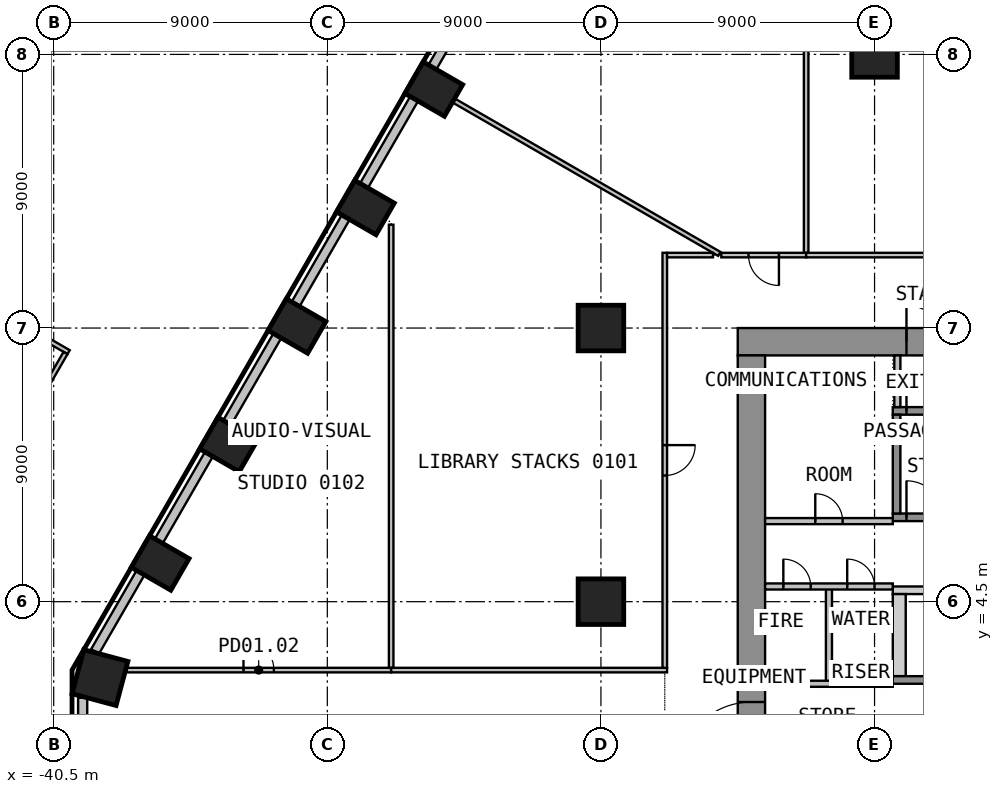
"""IFC4 building model, lengths in metres.
Left out: names, types, materials, properties, quantities, classifications, styles, units other than length and angle.
Written with IfcOpenShell. Run it as: python <this file> out.ifc"""

import sys

from ifc_helpers import new_model, si_unit, direction, frame, frame_2d, origin, origin_2d, place, context, subcontext, project, spatial, polyline, rectangle, circle, outline, extrude, element, fill, save


model = new_model("IFC4")
c1 = context("Model", 3, precision=1e-05, world=origin(), true_north=direction((0.0, 1.0)))
c2 = subcontext(c1, "Body", "Model", "MODEL_VIEW")
j1 = project(units=[si_unit("LENGTHUNIT", "METRE"), si_unit("PLANEANGLEUNIT", "RADIAN")], contexts=[c1])
p1 = place(None, origin())
s1 = spatial("IfcSite", under=j1, at=p1, CompositionType="ELEMENT")
p2 = place(p1, origin())
s2 = spatial("IfcBuilding", under=s1, at=p2, CompositionType="ELEMENT")
p3 = place(p2, frame((0.0, 0.0, 6.0)))
s3 = spatial("IfcBuildingStorey", under=s2, at=p3, CompositionType="ELEMENT", Elevation=6.0)
for number, where, z_axis, x_axis in (
    (1, (-27.998, 21.361, 0.0), (0.0, 0.0, 1.0), (-0.5, -0.866, 0.0)),
    (2, (-30.248, 17.463, 0.0), (0.0, 0.0, 1.0), (-0.5, -0.866, 0.0)),
    (3, (-32.498, 13.566, 0.0), (0.0, 0.0, 1.0), (-0.5, -0.866, 0.0)),
    (4, (-34.748, 9.669, 0.0), (0.0, 0.0, 1.0), (-0.5, -0.866, 0.0)),
    (5, (-36.998, 5.772, 0.0), (0.0, 0.0, 1.0), (-0.5, -0.866, 0.0)),
):
    element("IfcColumn", number, at=place(p3, frame(where, z_axis=z_axis, x_axis=x_axis)), inside=s3, PredefinedType="COLUMN", context=c2, shape_type="SweptSolid", body=[
        extrude(rectangle(XDim=1.2, YDim=1.5, at=origin_2d()), origin(), (0.0, 0.0, 1.0), 4.4),
    ])
p4 = place(p3, frame((-38.979, 2.004, 0.0), z_axis=(0.0, 0.0, 1.0), x_axis=(-0.258819045103, -0.965925826289, 0.0)))
e6 = element("IfcColumn", 6, at=p4, inside=s3, PredefinedType="COLUMN", context=c2, shape_type="SweptSolid", body=[
    extrude(rectangle(XDim=1.5, YDim=1.5, at=origin_2d()), origin(), (0.0, 0.0, 1.0), 4.4),
])
for number, where, z_axis, x_axis in (
    (7, (-22.5, 4.5, 0.0), (0.0, 0.0, 1.0), (1.0, 0.0, 0.0)),
    (8, (-22.5, 13.5, 0.0), (0.0, 0.0, 1.0), (1.0, 0.0, 0.0)),
    (9, (-13.5, 22.5, 0.0), (0.0, 0.0, 1.0), (1.0, 0.0, 0.0)),
):
    element("IfcColumn", number, at=place(p3, frame(where, z_axis=z_axis, x_axis=x_axis)), inside=s3, PredefinedType="COLUMN", context=c2, shape_type="SweptSolid", body=[
        extrude(circle(Radius=0.75, at=origin_2d()), origin(), (0.0, 0.0, 1.0), 4.4),
    ])
for number, where, z_axis, x_axis in (
    (10, (-26.394, 24.938, 0.0), (0.0, 0.0, 1.0), (-0.5, -0.866, 0.0)),
    (11, (-28.644, 21.041, 0.0), (0.0, 0.0, 1.0), (-0.5, -0.866, 0.0)),
    (12, (-30.894, 17.143, 0.0), (0.0, 0.0, 1.0), (-0.5, -0.866, 0.0)),
    (13, (-33.144, 13.246, 0.0), (0.0, 0.0, 1.0), (-0.5, -0.866, 0.0)),
    (14, (-35.394, 9.349, 0.0), (0.0, 0.0, 1.0), (-0.5, -0.866, 0.0)),
):
    element("IfcWall", number, at=place(p3, frame(where, z_axis=z_axis, x_axis=x_axis)), inside=s3, PredefinedType="SOLIDWALL", context=c2, shape_type="SweptSolid", body=[
        extrude(rectangle(XDim=3.299, YDim=0.3, at=frame_2d((1.649, 0.0))), origin(), (0.0, 0.0, 1.0), 4.4),
    ])
p5 = place(p3, frame((-37.644, 5.452, 0.0), z_axis=(0.0, 0.0, 1.0), x_axis=(-0.49999586137, -0.866027793211, 0.0)))
e15 = element("IfcWall", 15, at=p5, inside=s3, PredefinedType="SOLIDWALL", context=c2, shape_type="SweptSolid", body=[
    extrude(rectangle(XDim=2.989, YDim=0.3, at=frame_2d((1.494, 0.0))), origin(), (0.0, 0.0, 1.0), 4.4),
])
p6 = place(p3, frame((-39.547, 1.339, 0.0), z_axis=(0.0, 0.0, 1.0), x_axis=(0.0, -1.0, 0.0)))
e16 = element("IfcWall", 16, at=p6, inside=s3, PredefinedType="SOLIDWALL", context=c2, shape_type="SweptSolid", body=[
    extrude(rectangle(XDim=2.679, YDim=0.3, at=frame_2d((1.339, 0.0))), origin(), (0.0, 0.0, 1.0), 4.4),
])
p7 = place(p3, frame((-18.0, 13.05, 0.0), z_axis=(0.0, 0.0, 1.0), x_axis=(1.0, 0.0, 0.0)))
e17 = element("IfcWall", 17, at=p7, inside=s3, PredefinedType="SHEAR", context=c2, shape_type="SweptSolid", body=[
    extrude(rectangle(XDim=36.0, YDim=0.9, at=frame_2d((18.0, 0.0))), origin(), (0.0, 0.0, 1.0), 4.4),
])
p8 = place(p7, frame((16.8, 0.0, 0.0)))
e18 = element("IfcOpeningElement", 18, at=p8, cuts=e17, PredefinedType="OPENING", context=c2, shape_type="SweptSolid", body=[
    extrude(rectangle(XDim=2.4, YDim=2.1, at=frame_2d((1.2, 1.05))), frame((0.0, 0.46, 0.0), z_axis=(0.0, -1.0, 0.0), x_axis=(1.0, 0.0, 0.0)), (0.0, 0.0, 1.0), 0.92),
])
p9 = place(p7, frame((5.55, 0.0, 0.0)))
e19 = element("IfcOpeningElement", 19, at=p9, cuts=e17, PredefinedType="OPENING", context=c2, shape_type="SweptSolid", body=[
    extrude(rectangle(XDim=1.2, YDim=2.1, at=frame_2d((0.6, 1.05))), frame((0.0, 0.46, 0.0), z_axis=(0.0, -1.0, 0.0), x_axis=(1.0, 0.0, 0.0)), (0.0, 0.0, 1.0), 0.92),
])
p10 = place(p7, frame((29.25, 0.0, 0.0)))
e20 = element("IfcOpeningElement", 20, at=p10, cuts=e17, PredefinedType="OPENING", context=c2, shape_type="SweptSolid", body=[
    extrude(rectangle(XDim=1.2, YDim=2.1, at=frame_2d((0.6, 1.05))), frame((0.0, 0.46, 0.0), z_axis=(0.0, -1.0, 0.0), x_axis=(1.0, 0.0, 0.0)), (0.0, 0.0, 1.0), 0.92),
])
p11 = place(p3, frame((-17.55, -12.6, 0.0), z_axis=(0.0, 0.0, 1.0), x_axis=(0.0, 1.0, 0.0)))
e21 = element("IfcWall", 21, at=p11, inside=s3, PredefinedType="SHEAR", context=c2, shape_type="SweptSolid", body=[
    extrude(rectangle(XDim=25.2, YDim=0.9, at=frame_2d((12.6, 0.0))), origin(), (0.0, 0.0, 1.0), 4.4),
])
p12 = place(p11, frame((11.4, 0.0, 0.0)))
e22 = element("IfcOpeningElement", 22, at=p12, cuts=e21, PredefinedType="OPENING", context=c2, shape_type="SweptSolid", body=[
    extrude(rectangle(XDim=2.4, YDim=2.1, at=frame_2d((1.2, 1.05))), frame((0.0, 0.46, 0.0), z_axis=(0.0, -1.0, 0.0), x_axis=(1.0, 0.0, 0.0)), (0.0, 0.0, 1.0), 0.92),
])
p13 = place(p3, origin())
e23 = element("IfcWall", 23, at=p13, inside=s3, PredefinedType="SHEAR", context=c2, shape_type="SweptSolid", body=[
    extrude(outline(polyline([(-12.9, 4.75), (12.9, 4.75), (12.9, 5.0), (-12.9, 5.0), (-12.9, 4.75)])), origin(), (0.0, 0.0, 1.0), 4.4),
])
p14 = place(p3, origin())
e24 = element("IfcWall", 24, at=p14, inside=s3, PredefinedType="SHEAR", context=c2, shape_type="SweptSolid", body=[
    extrude(outline(polyline([(-12.9, 2.05), (-12.475, 2.05), (-12.475, 4.75), (-12.9, 4.75), (-12.9, 2.05)])), origin(), (0.0, 0.0, 1.0), 4.4),
])
p15 = place(p3, frame((-12.9, 1.925, 0.0), z_axis=(0.0, 0.0, 1.0), x_axis=(1.0, 0.0, 0.0)))
e25 = element("IfcWall", 25, at=p15, inside=s3, PredefinedType="SHEAR", context=c2, shape_type="SweptSolid", body=[
    extrude(rectangle(XDim=25.8, YDim=0.25, at=frame_2d((12.9, 0.0))), origin(), (0.0, 0.0, 1.0), 4.4),
])
p16 = place(p15, frame((9.5, 0.0, 0.0)))
e26 = element("IfcOpeningElement", 26, at=p16, cuts=e25, PredefinedType="OPENING", context=c2, shape_type="SweptSolid", body=[
    extrude(rectangle(XDim=1.2, YDim=2.1, at=frame_2d((0.6, 1.05))), frame((0.0, 0.135, 0.0), z_axis=(0.0, -1.0, 0.0), x_axis=(1.0, 0.0, 0.0)), (0.0, 0.0, 1.0), 0.27),
])
p17 = place(p15, frame((12.3, 0.0, 0.0)))
e27 = element("IfcOpeningElement", 27, at=p17, cuts=e25, PredefinedType="OPENING", context=c2, shape_type="SweptSolid", body=[
    extrude(rectangle(XDim=1.2, YDim=2.1, at=frame_2d((0.6, 1.05))), frame((0.0, 0.135, 0.0), z_axis=(0.0, -1.0, 0.0), x_axis=(1.0, 0.0, 0.0)), (0.0, 0.0, 1.0), 0.27),
])
p18 = place(p15, frame((15.1, 0.0, 0.0)))
e28 = element("IfcOpeningElement", 28, at=p18, cuts=e25, PredefinedType="OPENING", context=c2, shape_type="SweptSolid", body=[
    extrude(rectangle(XDim=1.2, YDim=2.1, at=frame_2d((0.6, 1.05))), frame((0.0, 0.135, 0.0), z_axis=(0.0, -1.0, 0.0), x_axis=(1.0, 0.0, 0.0)), (0.0, 0.0, 1.0), 0.27),
])
p19 = place(p15, frame((17.9, 0.0, 0.0)))
e29 = element("IfcOpeningElement", 29, at=p19, cuts=e25, PredefinedType="OPENING", context=c2, shape_type="SweptSolid", body=[
    extrude(rectangle(XDim=1.2, YDim=2.1, at=frame_2d((0.6, 1.05))), frame((0.0, 0.135, 0.0), z_axis=(0.0, -1.0, 0.0), x_axis=(1.0, 0.0, 0.0)), (0.0, 0.0, 1.0), 0.27),
])
p20 = place(p15, frame((20.7, 0.0, 0.0)))
e30 = element("IfcOpeningElement", 30, at=p20, cuts=e25, PredefinedType="OPENING", context=c2, shape_type="SweptSolid", body=[
    extrude(rectangle(XDim=1.2, YDim=2.1, at=frame_2d((0.6, 1.05))), frame((0.0, 0.135, 0.0), z_axis=(0.0, -1.0, 0.0), x_axis=(1.0, 0.0, 0.0)), (0.0, 0.0, 1.0), 0.27),
])
p21 = place(p15, frame((23.5, 0.0, 0.0)))
e31 = element("IfcOpeningElement", 31, at=p21, cuts=e25, PredefinedType="OPENING", context=c2, shape_type="SweptSolid", body=[
    extrude(rectangle(XDim=1.2, YDim=2.1, at=frame_2d((0.6, 1.05))), frame((0.0, 0.135, 0.0), z_axis=(0.0, -1.0, 0.0), x_axis=(1.0, 0.0, 0.0)), (0.0, 0.0, 1.0), 0.27),
])
p22 = place(p3, frame((-12.9, 7.275, 0.0), z_axis=(0.0, 0.0, 1.0), x_axis=(1.0, 0.0, 0.0)))
e32 = element("IfcWall", 32, at=p22, inside=s3, PredefinedType="SHEAR", context=c2, shape_type="SweptSolid", body=[
    extrude(rectangle(XDim=10.1, YDim=0.25, at=frame_2d((5.05, 0.0))), origin(), (0.0, 0.0, 1.0), 4.4),
])
p23 = place(p22, frame((0.45, 0.0, 0.0)))
e33 = element("IfcOpeningElement", 33, at=p23, cuts=e32, PredefinedType="OPENING", context=c2, shape_type="SweptSolid", body=[
    extrude(rectangle(XDim=1.2, YDim=2.1, at=frame_2d((0.6, 1.05))), frame((0.0, 0.135, 0.0), z_axis=(0.0, -1.0, 0.0), x_axis=(1.0, 0.0, 0.0)), (0.0, 0.0, 1.0), 0.27),
])
p24 = place(p3, frame((-12.9, 10.775, 0.0), z_axis=(0.0, 0.0, 1.0), x_axis=(1.0, 0.0, 0.0)))
e34 = element("IfcWall", 34, at=p24, inside=s3, PredefinedType="SHEAR", context=c2, shape_type="SweptSolid", body=[
    extrude(rectangle(XDim=10.1, YDim=0.25, at=frame_2d((5.05, 0.0))), origin(), (0.0, 0.0, 1.0), 4.4),
])
p25 = place(p24, frame((0.45, 0.0, 0.0)))
e35 = element("IfcOpeningElement", 35, at=p25, cuts=e34, PredefinedType="OPENING", context=c2, shape_type="SweptSolid", body=[
    extrude(rectangle(XDim=1.2, YDim=2.1, at=frame_2d((0.6, 1.05))), frame((0.0, 0.135, 0.0), z_axis=(0.0, -1.0, 0.0), x_axis=(1.0, 0.0, 0.0)), (0.0, 0.0, 1.0), 0.27),
])
p26 = place(p3, frame((-12.775, 7.4, 0.0), z_axis=(0.0, 0.0, 1.0), x_axis=(0.0, 1.0, 0.0)))
e36 = element("IfcWall", 36, at=p26, inside=s3, PredefinedType="SHEAR", context=c2, shape_type="SweptSolid", body=[
    extrude(rectangle(XDim=3.25, YDim=0.25, at=frame_2d((1.625, 0.0))), origin(), (0.0, 0.0, 1.0), 4.4),
])
p27 = place(p3, frame((-12.75, 10.9, 0.0), z_axis=(0.0, 0.0, 1.0), x_axis=(0.0, 1.0, 0.0)))
e37 = element("IfcWall", 37, at=p27, inside=s3, PredefinedType="PARTITIONING", context=c2, shape_type="SweptSolid", body=[
    extrude(rectangle(XDim=1.7, YDim=0.2, at=frame_2d((0.85, 0.0))), origin(), (0.0, 0.0, 1.0), 4.4),
])
p28 = place(p3, frame((-17.1, 7.15, 0.0), z_axis=(0.0, 0.0, 1.0), x_axis=(1.0, 0.0, 0.0)))
e38 = element("IfcWall", 38, at=p28, inside=s3, PredefinedType="PARTITIONING", context=c2, shape_type="SweptSolid", body=[
    extrude(rectangle(XDim=4.2, YDim=0.2, at=frame_2d((2.1, 0.0))), origin(), (0.0, 0.0, 1.0), 4.4),
])
p29 = place(p28, frame((1.65, 0.0, 0.0)))
e39 = element("IfcOpeningElement", 39, at=p29, cuts=e38, PredefinedType="OPENING", context=c2, shape_type="SweptSolid", body=[
    extrude(rectangle(XDim=0.9, YDim=2.1, at=frame_2d((0.45, 1.05))), frame((0.0, 0.11, 0.0), z_axis=(0.0, -1.0, 0.0), x_axis=(1.0, 0.0, 0.0)), (0.0, 0.0, 1.0), 0.22),
])
p30 = place(p3, frame((-15.0, 1.8, 0.0), z_axis=(0.0, 0.0, 1.0), x_axis=(0.0, 1.0, 0.0)))
e40 = element("IfcWall", 40, at=p30, inside=s3, PredefinedType="PARTITIONING", context=c2, shape_type="SweptSolid", body=[
    extrude(rectangle(XDim=3.2, YDim=0.2, at=frame_2d((1.6, 0.0))), origin(), (0.0, 0.0, 1.0), 4.4),
])
p31 = place(p3, frame((-17.1, 5.0, 0.0), z_axis=(0.0, 0.0, 1.0), x_axis=(1.0, 0.0, 0.0)))
e41 = element("IfcWall", 41, at=p31, inside=s3, PredefinedType="PARTITIONING", context=c2, shape_type="SweptSolid", body=[
    extrude(rectangle(XDim=4.2, YDim=0.2, at=frame_2d((2.1, 0.0))), origin(), (0.0, 0.0, 1.0), 4.4),
])
p32 = place(p31, frame((0.6, 0.0, 0.0)))
e42 = element("IfcOpeningElement", 42, at=p32, cuts=e41, PredefinedType="OPENING", context=c2, shape_type="SweptSolid", body=[
    extrude(rectangle(XDim=0.9, YDim=2.1, at=frame_2d((0.45, 1.05))), frame((0.0, 0.11, 0.0), z_axis=(0.0, -1.0, 0.0), x_axis=(1.0, 0.0, 0.0)), (0.0, 0.0, 1.0), 0.22),
])
p33 = place(p31, frame((2.7, 0.0, 0.0)))
e43 = element("IfcOpeningElement", 43, at=p33, cuts=e41, PredefinedType="OPENING", context=c2, shape_type="SweptSolid", body=[
    extrude(rectangle(XDim=0.9, YDim=2.1, at=frame_2d((0.45, 1.05))), frame((0.0, 0.11, 0.0), z_axis=(0.0, -1.0, 0.0), x_axis=(1.0, 0.0, 0.0)), (0.0, 0.0, 1.0), 0.22),
])
p34 = place(p3, frame((-17.1, 1.8, 0.0), z_axis=(0.0, 0.0, 1.0), x_axis=(1.0, 0.0, 0.0)))
e44 = element("IfcWall", 44, at=p34, inside=s3, PredefinedType="PARTITIONING", context=c2, shape_type="SweptSolid", body=[
    extrude(rectangle(XDim=4.2, YDim=0.2, at=frame_2d((2.1, 0.0))), origin(), (0.0, 0.0, 1.0), 4.4),
])
p35 = place(p3, frame((-40.009, 12.707, 0.0), z_axis=(0.0, 0.0, 1.0), x_axis=(-0.866024693403, 0.500001230415, 0.0)))
e45 = element("IfcWall", 45, at=p35, inside=s3, PredefinedType="PARTITIONING", context=c2, shape_type="SweptSolid", body=[
    extrude(rectangle(XDim=8.743, YDim=0.15, at=frame_2d((4.372, 0.0))), origin(), (0.0, 0.0, 1.0), 4.05),
])
p36 = place(p3, frame((-45.26, 3.762, 0.0), z_axis=(0.0, 0.0, 1.0), x_axis=(0.499979704663, 0.866037120986, 0.0)))
e46 = element("IfcWall", 46, at=p36, inside=s3, PredefinedType="PARTITIONING", context=c2, shape_type="SweptSolid", body=[
    extrude(rectangle(XDim=10.296, YDim=0.15, at=frame_2d((5.148, 0.0))), origin(), (0.0, 0.0, 1.0), 4.05),
])
p37 = place(p3, frame((-38.115, 2.25, 0.0), z_axis=(0.0, 0.0, 1.0), x_axis=(1.0, 0.0, 0.0)))
e47 = element("IfcWall", 47, at=p37, inside=s3, PredefinedType="PARTITIONING", context=c2, shape_type="SweptSolid", body=[
    extrude(rectangle(XDim=8.716, YDim=0.15, at=frame_2d((4.358, 0.0))), origin(), (0.0, 0.0, 1.0), 4.4),
])
p38 = place(p37, frame((3.858, 0.0, 0.0)))
e48 = element("IfcOpeningElement", 48, at=p38, cuts=e47, PredefinedType="OPENING", context=c2, shape_type="SweptSolid", body=[
    extrude(rectangle(XDim=1.0, YDim=2.1, at=frame_2d((0.5, 1.05))), frame((0.0, 0.085, 0.0), z_axis=(0.0, -1.0, 0.0), x_axis=(1.0, 0.0, 0.0)), (0.0, 0.0, 1.0), 0.17),
])
p39 = place(p3, frame((-29.4, 16.899, 0.0), z_axis=(0.0, 0.0, 1.0), x_axis=(0.0, -1.0, 0.0)))
e49 = element("IfcWall", 49, at=p39, inside=s3, PredefinedType="PARTITIONING", context=c2, shape_type="SweptSolid", body=[
    extrude(rectangle(XDim=14.574, YDim=0.15, at=frame_2d((7.287, 0.0))), origin(), (0.0, 0.0, 1.0), 4.4),
])
p40 = place(p3, frame((-29.4, 2.25, 0.0), z_axis=(0.0, 0.0, 1.0), x_axis=(1.0, 0.0, 0.0)))
e50 = element("IfcWall", 50, at=p40, inside=s3, PredefinedType="PARTITIONING", context=c2, shape_type="SweptSolid", body=[
    extrude(rectangle(XDim=9.075, YDim=0.15, at=frame_2d((4.538, 0.0))), origin(), (0.0, 0.0, 1.0), 4.4),
])
p41 = place(p3, frame((-27.331, 20.976, 0.0), z_axis=(0.0, 0.0, 1.0), x_axis=(0.865988664976, -0.500063628085, 0.0)))
e51 = element("IfcWall", 51, at=p41, inside=s3, PredefinedType="PARTITIONING", context=c2, shape_type="SweptSolid", body=[
    extrude(rectangle(XDim=10.076, YDim=0.15, at=frame_2d((5.038, 0.0))), origin(), (0.0, 0.0, 1.0), 4.4),
])
p42 = place(p3, frame((-20.4, 15.975, 0.0), z_axis=(0.0, 0.0, 1.0), x_axis=(0.0, -1.0, 0.0)))
e52 = element("IfcWall", 52, at=p42, inside=s3, PredefinedType="PARTITIONING", context=c2, shape_type="SweptSolid", body=[
    extrude(rectangle(XDim=13.65, YDim=0.15, at=frame_2d((6.825, 0.0))), origin(), (0.0, 0.0, 1.0), 4.4),
])
p43 = place(p42, frame((6.325, 0.0, 0.0)))
e53 = element("IfcOpeningElement", 53, at=p43, cuts=e52, PredefinedType="OPENING", context=c2, shape_type="SweptSolid", body=[
    extrude(rectangle(XDim=1.0, YDim=2.1, at=frame_2d((0.5, 1.05))), frame((0.0, 0.085, 0.0), z_axis=(0.0, -1.0, 0.0), x_axis=(1.0, 0.0, 0.0)), (0.0, 0.0, 1.0), 0.17),
])
p44 = place(p3, frame((-18.815, 15.9, 0.0), z_axis=(0.0, 0.0, 1.0), x_axis=(-1.0, 0.0, 0.0)))
e54 = element("IfcWall", 54, at=p44, inside=s3, PredefinedType="PARTITIONING", context=c2, shape_type="SweptSolid", body=[
    extrude(rectangle(XDim=1.51, YDim=0.15, at=frame_2d((0.755, 0.0))), origin(), (0.0, 0.0, 1.0), 4.4),
])
p45 = place(p3, frame((-15.75, 15.9, 0.0), z_axis=(0.0, 0.0, 1.0), x_axis=(-1.0, 0.0, 0.0)))
e55 = element("IfcWall", 55, at=p45, inside=s3, PredefinedType="PARTITIONING", context=c2, shape_type="SweptSolid", body=[
    extrude(rectangle(XDim=2.79, YDim=0.15, at=frame_2d((1.395, 0.0))), origin(), (0.0, 0.0, 1.0), 4.4),
])
p46 = place(p45, frame((0.895, 0.0, 0.0)))
e56 = element("IfcOpeningElement", 56, at=p46, cuts=e55, PredefinedType="OPENING", context=c2, shape_type="SweptSolid", body=[
    extrude(rectangle(XDim=1.0, YDim=2.1, at=frame_2d((0.5, 1.05))), frame((0.0, 0.085, 0.0), z_axis=(0.0, -1.0, 0.0), x_axis=(1.0, 0.0, 0.0)), (0.0, 0.0, 1.0), 0.17),
])
p47 = place(p3, frame((-15.75, 30.26, 0.0), z_axis=(0.0, 0.0, 1.0), x_axis=(0.0, -1.0, 0.0)))
e57 = element("IfcWall", 57, at=p47, inside=s3, PredefinedType="PARTITIONING", context=c2, shape_type="SweptSolid", body=[
    extrude(rectangle(XDim=14.285, YDim=0.15, at=frame_2d((7.142, 0.0))), origin(), (0.0, 0.0, 1.0), 4.4),
])
p48 = place(p3, frame((-2.175, 15.9, 0.0), z_axis=(0.0, 0.0, 1.0), x_axis=(-1.0, 0.0, 0.0)))
e58 = element("IfcWall", 58, at=p48, inside=s3, PredefinedType="PARTITIONING", context=c2, shape_type="SweptSolid", body=[
    extrude(rectangle(XDim=13.575, YDim=0.15, at=frame_2d((6.788, 0.0))), origin(), (0.0, 0.0, 1.0), 4.4),
])
p49 = place(p12, origin())
e59 = element("IfcDoor", 59, at=p49, inside=s3, OperationType="DOUBLE_DOOR_DOUBLE_SWING", PredefinedType="DOOR", context=c2, shape_type="SweptSolid", body=[
    extrude(rectangle(XDim=2.4, YDim=2.1, at=frame_2d((1.2, 1.05))), frame((0.0, 0.025, 0.0), z_axis=(0.0, -1.0, 0.0), x_axis=(1.0, 0.0, 0.0)), (0.0, 0.0, 1.0), 0.05),
])
fill(e22, e59)
p50 = place(p9, origin())
e60 = element("IfcDoor", 60, at=p50, inside=s3, OperationType="SINGLE_SWING_RIGHT", PredefinedType="DOOR", context=c2, shape_type="SweptSolid", body=[
    extrude(rectangle(XDim=1.2, YDim=2.1, at=frame_2d((0.6, 1.05))), frame((0.0, 0.025, 0.0), z_axis=(0.0, -1.0, 0.0), x_axis=(1.0, 0.0, 0.0)), (0.0, 0.0, 1.0), 0.05),
])
fill(e19, e60)
p51 = place(p23, origin())
e61 = element("IfcDoor", 61, at=p51, inside=s3, OperationType="SINGLE_SWING_LEFT", PredefinedType="DOOR", context=c2, shape_type="SweptSolid", body=[
    extrude(rectangle(XDim=1.2, YDim=2.1, at=frame_2d((0.6, 1.05))), frame((0.0, 0.025, 0.0), z_axis=(0.0, -1.0, 0.0), x_axis=(1.0, 0.0, 0.0)), (0.0, 0.0, 1.0), 0.05),
])
fill(e33, e61)
p52 = place(p25, origin())
e62 = element("IfcDoor", 62, at=p52, inside=s3, OperationType="SINGLE_SWING_RIGHT", PredefinedType="DOOR", context=c2, shape_type="SweptSolid", body=[
    extrude(rectangle(XDim=1.2, YDim=2.1, at=frame_2d((0.6, 1.05))), frame((0.0, 0.025, 0.0), z_axis=(0.0, -1.0, 0.0), x_axis=(1.0, 0.0, 0.0)), (0.0, 0.0, 1.0), 0.05),
])
fill(e35, e62)
p53 = place(p29, origin())
e63 = element("IfcDoor", 63, at=p53, inside=s3, OperationType="SINGLE_SWING_LEFT", PredefinedType="DOOR", context=c2, shape_type="SweptSolid", body=[
    extrude(rectangle(XDim=0.9, YDim=2.1, at=frame_2d((0.45, 1.05))), frame((0.0, 0.025, 0.0), z_axis=(0.0, -1.0, 0.0), x_axis=(1.0, 0.0, 0.0)), (0.0, 0.0, 1.0), 0.05),
])
fill(e39, e63)
p54 = place(p32, origin())
e64 = element("IfcDoor", 64, at=p54, inside=s3, OperationType="SINGLE_SWING_LEFT", PredefinedType="DOOR", context=c2, shape_type="SweptSolid", body=[
    extrude(rectangle(XDim=0.9, YDim=2.1, at=frame_2d((0.45, 1.05))), frame((0.0, 0.025, 0.0), z_axis=(0.0, -1.0, 0.0), x_axis=(1.0, 0.0, 0.0)), (0.0, 0.0, 1.0), 0.05),
])
fill(e42, e64)
p55 = place(p33, origin())
e65 = element("IfcDoor", 65, at=p55, inside=s3, OperationType="SINGLE_SWING_LEFT", PredefinedType="DOOR", context=c2, shape_type="SweptSolid", body=[
    extrude(rectangle(XDim=0.9, YDim=2.1, at=frame_2d((0.45, 1.05))), frame((0.0, 0.025, 0.0), z_axis=(0.0, -1.0, 0.0), x_axis=(1.0, 0.0, 0.0)), (0.0, 0.0, 1.0), 0.05),
])
fill(e43, e65)
p56 = place(p38, origin())
e66 = element("IfcDoor", 66, at=p56, inside=s3, OperationType="SINGLE_SWING_RIGHT", PredefinedType="DOOR", context=c2, shape_type="SweptSolid", body=[
    extrude(rectangle(XDim=1.0, YDim=2.1, at=frame_2d((0.5, 1.05))), frame((0.0, 0.025, 0.0), z_axis=(0.0, -1.0, 0.0), x_axis=(1.0, 0.0, 0.0)), (0.0, 0.0, 1.0), 0.05),
])
fill(e48, e66)
p57 = place(p43, origin())
e67 = element("IfcDoor", 67, at=p57, inside=s3, OperationType="SINGLE_SWING_RIGHT", PredefinedType="DOOR", context=c2, shape_type="SweptSolid", body=[
    extrude(rectangle(XDim=1.0, YDim=2.1, at=frame_2d((0.5, 1.05))), frame((0.0, 0.025, 0.0), z_axis=(0.0, -1.0, 0.0), x_axis=(1.0, 0.0, 0.0)), (0.0, 0.0, 1.0), 0.05),
])
fill(e53, e67)
p58 = place(p46, origin())
e68 = element("IfcDoor", 68, at=p58, inside=s3, OperationType="SINGLE_SWING_RIGHT", PredefinedType="DOOR", context=c2, shape_type="SweptSolid", body=[
    extrude(rectangle(XDim=1.0, YDim=2.1, at=frame_2d((0.5, 1.05))), frame((0.0, 0.025, 0.0), z_axis=(0.0, -1.0, 0.0), x_axis=(1.0, 0.0, 0.0)), (0.0, 0.0, 1.0), 0.05),
])
fill(e56, e68)
save(model, sys.argv[1])
